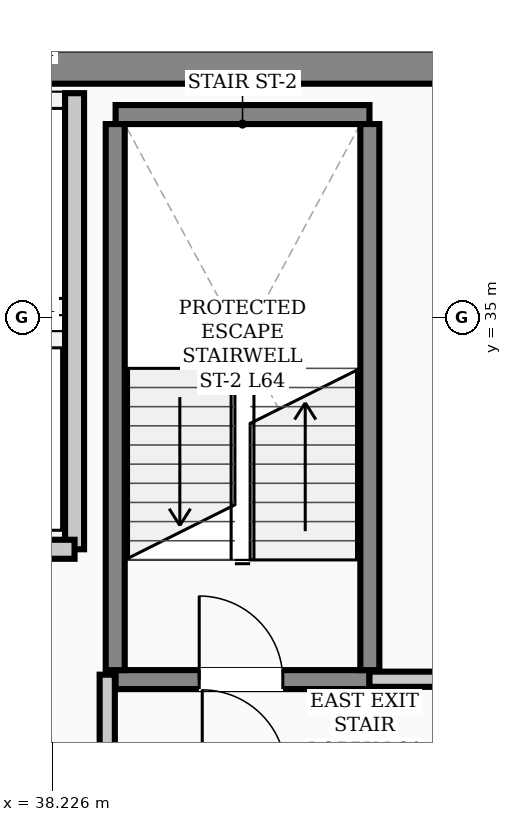
"""IFC4 building model, lengths in metres.
Left out: names, types, materials, properties, quantities, classifications, styles, units other than length and angle.
Written with IfcOpenShell. Run it as: python <this file> out.ifc"""

import sys

from ifc_helpers import new_model, si_unit, direction, frame, frame_2d, origin, place, context, subcontext, project, spatial, rectangle, extrude, element, fill, save


model = new_model("IFC4")
c1 = context("Model", 3, precision=1e-05, world=origin(), true_north=direction((0.0, 1.0)))
c2 = subcontext(c1, "Body", "Model", "MODEL_VIEW")
j1 = project(units=[si_unit("LENGTHUNIT", "METRE"), si_unit("PLANEANGLEUNIT", "RADIAN")], contexts=[c1])
p1 = place(None, origin())
s1 = spatial("IfcSite", under=j1, at=p1, CompositionType="ELEMENT")
p2 = place(p1, origin())
s2 = spatial("IfcBuilding", under=s1, at=p2, CompositionType="ELEMENT")
p3 = place(p2, frame((0.0, 0.0, 257.9)))
s3 = spatial("IfcBuildingStorey", under=s2, at=p3, CompositionType="ELEMENT", Elevation=257.9)
p4 = place(p3, frame((13.5, 38.3, 0.0), z_axis=(0.0, 0.0, 1.0), x_axis=(1.0, 0.0, 0.0)))
e1 = element("IfcWall", 1, at=p4, inside=s3, PredefinedType="SHEAR", context=c2, shape_type="SweptSolid", body=[
    extrude(rectangle(XDim=30.5, YDim=0.45, at=frame_2d((15.25, 0.0))), origin(), (0.0, 0.0, 1.0), 3.72),
])
p5 = place(p3, frame((39.06, 30.235, 0.0), z_axis=(0.0, 0.0, 1.0), x_axis=(1.0, 0.0, 0.0)))
e2 = element("IfcWall", 2, at=p5, inside=s3, PredefinedType="STANDARD", context=c2, shape_type="SweptSolid", body=[
    extrude(rectangle(XDim=3.34, YDim=0.25, at=frame_2d((1.67, 0.0))), origin(), (0.0, 0.0, 1.0), 3.72),
])
p6 = place(p5, frame((1.1, 0.0, 0.0)))
e3 = element("IfcOpeningElement", 3, at=p6, cuts=e2, PredefinedType="OPENING", context=c2, shape_type="SweptSolid", body=[
    extrude(rectangle(XDim=1.1, YDim=2.08, at=frame_2d((0.55, 1.04))), frame((0.0, 0.135, 0.0), z_axis=(0.0, -1.0, 0.0), x_axis=(1.0, 0.0, 0.0)), (0.0, 0.0, 1.0), 0.27),
])
p7 = place(p3, frame((39.06, 37.669, 0.0), z_axis=(0.0, 0.0, 1.0), x_axis=(1.0, 0.0, 0.0)))
e4 = element("IfcWall", 4, at=p7, inside=s3, PredefinedType="STANDARD", context=c2, shape_type="SweptSolid", body=[
    extrude(rectangle(XDim=3.34, YDim=0.25, at=frame_2d((1.67, 0.0))), origin(), (0.0, 0.0, 1.0), 3.72),
])
for number, where, z_axis, x_axis in (
    (5, (39.055, 30.36, 0.0), (0.0, 0.0, 1.0), (0.0, 1.0, 0.0)),
    (6, (42.405, 30.36, 0.0), (0.0, 0.0, 1.0), (0.0, 1.0, 0.0)),
):
    element("IfcWall", number, at=place(p3, frame(where, z_axis=z_axis, x_axis=x_axis)), inside=s3, PredefinedType="STANDARD", context=c2, shape_type="SweptSolid", body=[
        extrude(rectangle(XDim=7.184, YDim=0.25, at=frame_2d((3.592, 0.0))), origin(), (0.0, 0.0, 1.0), 3.72),
    ])
p8 = place(p3, frame((38.52, 31.95, 0.0), z_axis=(0.0, 0.0, 1.0), x_axis=(0.0, 1.0, 0.0)))
e7 = element("IfcWall", 7, at=p8, inside=s3, PredefinedType="STANDARD", context=c2, shape_type="SweptSolid", body=[
    extrude(rectangle(XDim=6.0, YDim=0.25, at=frame_2d((3.0, 0.0))), origin(), (0.0, 0.0, 1.0), 3.48),
])
p9 = place(p3, frame((36.62, 31.95, 0.0), z_axis=(0.0, 0.0, 1.0), x_axis=(1.0, 0.0, 0.0)))
e8 = element("IfcWall", 8, at=p9, inside=s3, PredefinedType="STANDARD", context=c2, shape_type="SweptSolid", body=[
    extrude(rectangle(XDim=1.9, YDim=0.25, at=frame_2d((0.95, 0.0))), origin(), (0.0, 0.0, 1.0), 3.48),
])
p10 = place(p3, frame((42.4, 30.24, 0.0), z_axis=(0.0, 0.0, 1.0), x_axis=(1.0, 0.0, 0.0)))
e9 = element("IfcWall", 9, at=p10, inside=s3, PredefinedType="STANDARD", context=c2, shape_type="SweptSolid", body=[
    extrude(rectangle(XDim=1.365, YDim=0.2, at=frame_2d((0.683, 0.0))), origin(), (0.0, 0.0, 1.0), 3.72),
])
p11 = place(p3, frame((38.95, 29.235, 0.0), z_axis=(0.0, 0.0, 1.0), x_axis=(0.0, 1.0, 0.0)))
e10 = element("IfcWall", 10, at=p11, inside=s3, PredefinedType="STANDARD", context=c2, shape_type="SweptSolid", body=[
    extrude(rectangle(XDim=1.065, YDim=0.2, at=frame_2d((0.532, 0.0))), origin(), (0.0, 0.0, 1.0), 3.72),
])
p12 = place(p6, origin())
e11 = element("IfcDoor", 11, at=p12, inside=s3, OperationType="SINGLE_SWING_LEFT", PredefinedType="DOOR", context=c2, shape_type="SweptSolid", body=[
    extrude(rectangle(XDim=1.1, YDim=2.08, at=frame_2d((0.55, 1.04))), frame((0.0, 0.025, 0.0), z_axis=(0.0, -1.0, 0.0), x_axis=(1.0, 0.0, 0.0)), (0.0, 0.0, 1.0), 0.05),
])
fill(e3, e11)
save(model, sys.argv[1])
